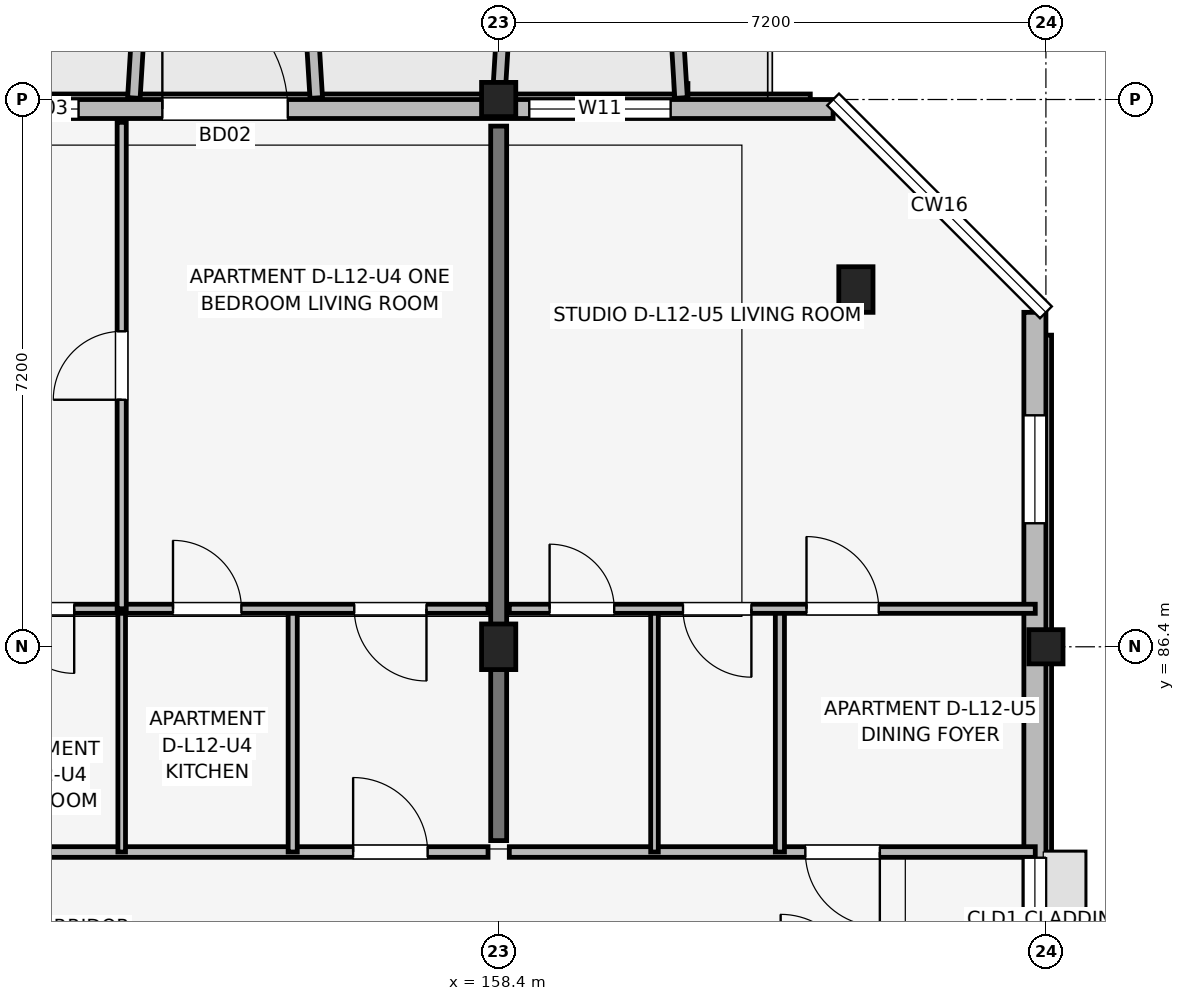
"""IFC4 building model, lengths in metres.
Left out: names, types, materials, properties, quantities, classifications, styles, units other than length and angle.
Written with IfcOpenShell. Run it as: python <this file> out.ifc"""

import sys

from ifc_helpers import new_model, si_unit, direction, frame, frame_2d, origin, origin_2d, place, context, subcontext, project, spatial, rectangle, extrude, element, fill, save


model = new_model("IFC4")
c1 = context("Model", 3, precision=1e-05, world=origin(), true_north=direction((0.0, 1.0)))
c2 = subcontext(c1, "Body", "Model", "MODEL_VIEW")
j1 = project(units=[si_unit("LENGTHUNIT", "METRE"), si_unit("PLANEANGLEUNIT", "RADIAN")], contexts=[c1])
p1 = place(None, origin())
s1 = spatial("IfcSite", under=j1, at=p1, CompositionType="ELEMENT")
p2 = place(p1, origin())
s2 = spatial("IfcBuilding", under=s1, at=p2, CompositionType="ELEMENT")
p3 = place(p2, frame((0.0, 0.0, 40.2)))
s3 = spatial("IfcBuildingStorey", under=s2, at=p3, CompositionType="ELEMENT", Elevation=40.2)
p4 = place(p3, frame((158.4, 86.4, 0.0), z_axis=(0.0, 0.0, 1.0), x_axis=(1.0, 0.0, 0.0)))
e1 = element("IfcColumn", 1, at=p4, inside=s3, PredefinedType="COLUMN", context=c2, shape_type="SweptSolid", body=[
    extrude(rectangle(XDim=0.45, YDim=0.6, at=origin_2d()), origin(), (0.0, 0.0, 1.0), 3.15),
])
for number, where, z_axis, x_axis in (
    (2, (158.4, 93.6, 0.0), (0.0, 0.0, 1.0), (1.0, 0.0, 0.0)),
    (3, (165.6, 86.4, 0.0), (0.0, 0.0, 1.0), (1.0, 0.0, 0.0)),
):
    element("IfcColumn", number, at=place(p3, frame(where, z_axis=z_axis, x_axis=x_axis)), inside=s3, PredefinedType="COLUMN", context=c2, shape_type="SweptSolid", body=[
        extrude(rectangle(XDim=0.45, YDim=0.45, at=origin_2d()), origin(), (0.0, 0.0, 1.0), 3.15),
    ])
p5 = place(p3, frame((163.1, 91.1, 0.0), z_axis=(0.0, 0.0, 1.0), x_axis=(1.0, 0.0, 0.0)))
e4 = element("IfcColumn", 4, at=p5, inside=s3, PredefinedType="COLUMN", context=c2, shape_type="SweptSolid", body=[
    extrude(rectangle(XDim=0.45, YDim=0.6, at=origin_2d()), origin(), (0.0, 0.0, 1.0), 3.15),
])
p6 = place(p3, frame((158.4, 83.85, 0.0), z_axis=(0.0, 0.0, 1.0), x_axis=(0.0, 1.0, 0.0)))
e5 = element("IfcWall", 5, at=p6, inside=s3, PredefinedType="SHEAR", context=c2, shape_type="SweptSolid", body=[
    extrude(rectangle(XDim=9.4, YDim=0.21, at=frame_2d((4.7, 0.0))), origin(), (0.0, 0.0, 1.0), 3.15),
])
p7 = place(p3, frame((165.455, 74.8, 0.0), z_axis=(0.0, 0.0, 1.0), x_axis=(0.0, 1.0, 0.0)))
e6 = element("IfcWall", 6, at=p7, inside=s3, PredefinedType="SOLIDWALL", context=c2, shape_type="SweptSolid", body=[
    extrude(rectangle(XDim=16.0, YDim=0.29, at=frame_2d((8.0, 0.0))), origin(), (0.0, 0.0, 1.0), 2.51),
])
p8 = place(p7, frame((7.175, 0.0, 1.05)))
e7 = element("IfcOpeningElement", 7, at=p8, cuts=e6, PredefinedType="OPENING", context=c2, shape_type="SweptSolid", body=[
    extrude(rectangle(XDim=1.65, YDim=1.15, at=frame_2d((0.825, 0.575))), frame((0.0, 0.155, 0.0), z_axis=(0.0, -1.0, 0.0), x_axis=(1.0, 0.0, 0.0)), (0.0, 0.0, 1.0), 0.31),
])
p9 = place(p7, frame((13.225, 0.0, 0.75)))
e8 = element("IfcOpeningElement", 8, at=p9, cuts=e6, PredefinedType="OPENING", context=c2, shape_type="SweptSolid", body=[
    extrude(rectangle(XDim=1.42, YDim=1.6, at=frame_2d((0.71, 0.8))), frame((0.0, 0.155, 0.0), z_axis=(0.0, -1.0, 0.0), x_axis=(1.0, 0.0, 0.0)), (0.0, 0.0, 1.0), 0.31),
])
p10 = place(p3, frame((162.8, 93.475, 0.0), z_axis=(0.0, 0.0, 1.0), x_axis=(-1.0, 0.0, 0.0)))
e9 = element("IfcWall", 9, at=p10, inside=s3, PredefinedType="SOLIDWALL", context=c2, shape_type="SweptSolid", body=[
    extrude(rectangle(XDim=30.4, YDim=0.25, at=frame_2d((15.2, 0.0))), origin(), (0.0, 0.0, 1.0), 2.48),
])
p11 = place(p10, frame((23.3, 0.0, 0.0), z_axis=(0.0, 0.0, 1.0), x_axis=(-1.0, 0.0, 0.0)))
e10 = element("IfcOpeningElement", 10, at=p11, cuts=e9, PredefinedType="OPENING", context=c2, shape_type="SweptSolid", body=[
    extrude(rectangle(XDim=1.8, YDim=2.15, at=frame_2d((0.9, 1.075))), frame((0.0, 0.135, 0.0), z_axis=(0.0, -1.0, 0.0), x_axis=(1.0, 0.0, 0.0)), (0.0, 0.0, 1.0), 0.27),
])
p12 = place(p10, frame((8.825, 0.0, 0.0), z_axis=(0.0, 0.0, 1.0), x_axis=(-1.0, 0.0, 0.0)))
e11 = element("IfcOpeningElement", 11, at=p12, cuts=e9, PredefinedType="OPENING", context=c2, shape_type="SweptSolid", body=[
    extrude(rectangle(XDim=1.65, YDim=2.15, at=frame_2d((0.825, 1.075))), frame((0.0, 0.135, 0.0), z_axis=(0.0, -1.0, 0.0), x_axis=(1.0, 0.0, 0.0)), (0.0, 0.0, 1.0), 0.27),
])
p13 = place(p10, frame((26.603, 0.0, 0.75)))
e12 = element("IfcOpeningElement", 12, at=p13, cuts=e9, PredefinedType="OPENING", context=c2, shape_type="SweptSolid", body=[
    extrude(rectangle(XDim=1.46, YDim=1.55, at=frame_2d((0.73, 0.775))), frame((0.0, 0.135, 0.0), z_axis=(0.0, -1.0, 0.0), x_axis=(1.0, 0.0, 0.0)), (0.0, 0.0, 1.0), 0.27),
])
p14 = place(p10, frame((24.452, 0.0, 0.75)))
e13 = element("IfcOpeningElement", 13, at=p14, cuts=e9, PredefinedType="OPENING", context=c2, shape_type="SweptSolid", body=[
    extrude(rectangle(XDim=0.6, YDim=1.25, at=frame_2d((0.3, 0.625))), frame((0.0, 0.135, 0.0), z_axis=(0.0, -1.0, 0.0), x_axis=(1.0, 0.0, 0.0)), (0.0, 0.0, 1.0), 0.27),
])
p15 = place(p10, frame((14.2, 0.0, 0.7)))
e14 = element("IfcOpeningElement", 14, at=p15, cuts=e9, PredefinedType="OPENING", context=c2, shape_type="SweptSolid", body=[
    extrude(rectangle(XDim=2.0, YDim=1.65, at=frame_2d((1.0, 0.825))), frame((0.0, 0.135, 0.0), z_axis=(0.0, -1.0, 0.0), x_axis=(1.0, 0.0, 0.0)), (0.0, 0.0, 1.0), 0.27),
])
p16 = place(p10, frame((9.927, 0.0, 0.75)))
e15 = element("IfcOpeningElement", 15, at=p16, cuts=e9, PredefinedType="OPENING", context=c2, shape_type="SweptSolid", body=[
    extrude(rectangle(XDim=0.85, YDim=1.4, at=frame_2d((0.425, 0.7))), frame((0.0, 0.135, 0.0), z_axis=(0.0, -1.0, 0.0), x_axis=(1.0, 0.0, 0.0)), (0.0, 0.0, 1.0), 0.27),
])
p17 = place(p10, frame((2.137, 0.0, 0.7)))
e16 = element("IfcOpeningElement", 16, at=p17, cuts=e9, PredefinedType="OPENING", context=c2, shape_type="SweptSolid", body=[
    extrude(rectangle(XDim=1.86, YDim=1.6, at=frame_2d((0.93, 0.8))), frame((0.0, 0.135, 0.0), z_axis=(0.0, -1.0, 0.0), x_axis=(1.0, 0.0, 0.0)), (0.0, 0.0, 1.0), 0.27),
])
for number, where, z_axis, x_axis in (
    (17, (153.6, 93.62, 0.0), (0.0, 0.0, 1.0), (0.061, 0.998, 0.0)),
    (18, (156.0, 93.62, 0.0), (0.0, 0.0, 1.0), (-0.061, 0.998, 0.0)),
):
    element("IfcWall", number, at=place(p3, frame(where, z_axis=z_axis, x_axis=x_axis)), inside=s3, PredefinedType="ELEMENTEDWALL", context=c2, shape_type="SweptSolid", body=[
        extrude(rectangle(XDim=1.964, YDim=0.165, at=frame_2d((0.982, 0.0))), origin(), (0.0, 0.0, 1.0), 2.48),
    ])
for number, where, z_axis, x_axis in (
    (19, (158.4, 93.62, 0.0), (0.0, 0.0, 1.0), (0.061, 0.998, 0.0)),
    (20, (160.8, 93.62, 0.0), (0.0, 0.0, 1.0), (-0.061, 0.998, 0.0)),
):
    element("IfcWall", number, at=place(p3, frame(where, z_axis=z_axis, x_axis=x_axis)), inside=s3, PredefinedType="ELEMENTEDWALL", context=c2, shape_type="SweptSolid", body=[
        extrude(rectangle(XDim=1.964, YDim=0.165, at=frame_2d((0.982, 0.0))), origin(), (0.0, 0.0, 1.0), 2.95),
    ])
p18 = place(p3, frame((151.34, 83.7, 0.0), z_axis=(0.0, 0.0, 1.0), x_axis=(1.0, 0.0, 0.0)))
e21 = element("IfcWall", 21, at=p18, inside=s3, PredefinedType="PARTITIONING", context=c2, shape_type="SweptSolid", body=[
    extrude(rectangle(XDim=6.92, YDim=0.14, at=frame_2d((3.46, 0.0))), origin(), (0.0, 0.0, 1.0), 2.38),
])
p19 = place(p18, frame((5.145, 0.0, 0.0)))
e22 = element("IfcOpeningElement", 22, at=p19, cuts=e21, PredefinedType="OPENING", context=c2, shape_type="SweptSolid", body=[
    extrude(rectangle(XDim=0.98, YDim=2.1, at=frame_2d((0.49, 1.05))), frame((0.0, 0.08, 0.0), z_axis=(0.0, -1.0, 0.0), x_axis=(1.0, 0.0, 0.0)), (0.0, 0.0, 1.0), 0.16),
])
p20 = place(p3, frame((153.44, 83.7, 0.0), z_axis=(0.0, 0.0, 1.0), x_axis=(0.0, 1.0, 0.0)))
e23 = element("IfcWall", 23, at=p20, inside=s3, PredefinedType="PARTITIONING", context=c2, shape_type="SweptSolid", body=[
    extrude(rectangle(XDim=3.2, YDim=0.1, at=frame_2d((1.6, 0.0))), origin(), (0.0, 0.0, 1.0), 2.38),
])
p21 = place(p3, frame((155.69, 83.7, 0.0), z_axis=(0.0, 0.0, 1.0), x_axis=(0.0, 1.0, 0.0)))
e24 = element("IfcWall", 24, at=p21, inside=s3, PredefinedType="PARTITIONING", context=c2, shape_type="SweptSolid", body=[
    extrude(rectangle(XDim=3.2, YDim=0.12, at=frame_2d((1.6, 0.0))), origin(), (0.0, 0.0, 1.0), 2.38),
])
p22 = place(p3, frame((151.34, 86.9, 0.0), z_axis=(0.0, 0.0, 1.0), x_axis=(1.0, 0.0, 0.0)))
e25 = element("IfcWall", 25, at=p22, inside=s3, PredefinedType="PARTITIONING", context=c2, shape_type="SweptSolid", body=[
    extrude(rectangle(XDim=6.92, YDim=0.12, at=frame_2d((3.46, 0.0))), origin(), (0.0, 0.0, 1.0), 2.38),
])
p23 = place(p22, frame((1.475, 0.0, 0.0), z_axis=(0.0, 0.0, 1.0), x_axis=(-1.0, 0.0, 0.0)))
e26 = element("IfcOpeningElement", 26, at=p23, cuts=e25, PredefinedType="OPENING", context=c2, shape_type="SweptSolid", body=[
    extrude(rectangle(XDim=0.85, YDim=2.08, at=frame_2d((0.425, 1.04))), frame((0.0, 0.07, 0.0), z_axis=(0.0, -1.0, 0.0), x_axis=(1.0, 0.0, 0.0)), (0.0, 0.0, 1.0), 0.14),
])
p24 = place(p22, frame((2.775, 0.0, 0.0)))
e27 = element("IfcOpeningElement", 27, at=p24, cuts=e25, PredefinedType="OPENING", context=c2, shape_type="SweptSolid", body=[
    extrude(rectangle(XDim=0.9, YDim=2.08, at=frame_2d((0.45, 1.04))), frame((0.0, 0.07, 0.0), z_axis=(0.0, -1.0, 0.0), x_axis=(1.0, 0.0, 0.0)), (0.0, 0.0, 1.0), 0.14),
])
p25 = place(p22, frame((6.11, 0.0, 0.0), z_axis=(0.0, 0.0, 1.0), x_axis=(-1.0, 0.0, 0.0)))
e28 = element("IfcOpeningElement", 28, at=p25, cuts=e25, PredefinedType="OPENING", context=c2, shape_type="SweptSolid", body=[
    extrude(rectangle(XDim=0.95, YDim=2.08, at=frame_2d((0.475, 1.04))), frame((0.0, 0.07, 0.0), z_axis=(0.0, -1.0, 0.0), x_axis=(1.0, 0.0, 0.0)), (0.0, 0.0, 1.0), 0.14),
])
p26 = place(p3, frame((153.44, 86.9, 0.0), z_axis=(0.0, 0.0, 1.0), x_axis=(0.0, 1.0, 0.0)))
e29 = element("IfcWall", 29, at=p26, inside=s3, PredefinedType="PARTITIONING", context=c2, shape_type="SweptSolid", body=[
    extrude(rectangle(XDim=6.4, YDim=0.12, at=frame_2d((3.2, 0.0))), origin(), (0.0, 0.0, 1.0), 2.38),
])
p27 = place(p26, frame((2.75, 0.0, 0.0)))
e30 = element("IfcOpeningElement", 30, at=p27, cuts=e29, PredefinedType="OPENING", context=c2, shape_type="SweptSolid", body=[
    extrude(rectangle(XDim=0.9, YDim=2.08, at=frame_2d((0.45, 1.04))), frame((0.0, 0.07, 0.0), z_axis=(0.0, -1.0, 0.0), x_axis=(1.0, 0.0, 0.0)), (0.0, 0.0, 1.0), 0.14),
])
p28 = place(p3, frame((158.54, 83.7, 0.0), z_axis=(0.0, 0.0, 1.0), x_axis=(1.0, 0.0, 0.0)))
e31 = element("IfcWall", 31, at=p28, inside=s3, PredefinedType="PARTITIONING", context=c2, shape_type="SweptSolid", body=[
    extrude(rectangle(XDim=6.92, YDim=0.14, at=frame_2d((3.46, 0.0))), origin(), (0.0, 0.0, 1.0), 2.38),
])
p29 = place(p28, frame((4.875, 0.0, 0.0), z_axis=(0.0, 0.0, 1.0), x_axis=(-1.0, 0.0, 0.0)))
e32 = element("IfcOpeningElement", 32, at=p29, cuts=e31, PredefinedType="OPENING", context=c2, shape_type="SweptSolid", body=[
    extrude(rectangle(XDim=0.98, YDim=2.1, at=frame_2d((0.49, 1.05))), frame((0.0, 0.08, 0.0), z_axis=(0.0, -1.0, 0.0), x_axis=(1.0, 0.0, 0.0)), (0.0, 0.0, 1.0), 0.16),
])
p30 = place(p3, frame((160.45, 83.7, 0.0), z_axis=(0.0, 0.0, 1.0), x_axis=(0.0, 1.0, 0.0)))
e33 = element("IfcWall", 33, at=p30, inside=s3, PredefinedType="PARTITIONING", context=c2, shape_type="SweptSolid", body=[
    extrude(rectangle(XDim=3.2, YDim=0.1, at=frame_2d((1.6, 0.0))), origin(), (0.0, 0.0, 1.0), 2.38),
])
p31 = place(p3, frame((162.1, 83.7, 0.0), z_axis=(0.0, 0.0, 1.0), x_axis=(0.0, 1.0, 0.0)))
e34 = element("IfcWall", 34, at=p31, inside=s3, PredefinedType="PARTITIONING", context=c2, shape_type="SweptSolid", body=[
    extrude(rectangle(XDim=3.2, YDim=0.12, at=frame_2d((1.6, 0.0))), origin(), (0.0, 0.0, 1.0), 2.38),
])
p32 = place(p3, frame((158.54, 86.9, 0.0), z_axis=(0.0, 0.0, 1.0), x_axis=(1.0, 0.0, 0.0)))
e35 = element("IfcWall", 35, at=p32, inside=s3, PredefinedType="PARTITIONING", context=c2, shape_type="SweptSolid", body=[
    extrude(rectangle(XDim=6.92, YDim=0.12, at=frame_2d((3.46, 0.0))), origin(), (0.0, 0.0, 1.0), 2.38),
])
p33 = place(p32, frame((0.53, 0.0, 0.0)))
e36 = element("IfcOpeningElement", 36, at=p33, cuts=e35, PredefinedType="OPENING", context=c2, shape_type="SweptSolid", body=[
    extrude(rectangle(XDim=0.85, YDim=2.08, at=frame_2d((0.425, 1.04))), frame((0.0, 0.07, 0.0), z_axis=(0.0, -1.0, 0.0), x_axis=(1.0, 0.0, 0.0)), (0.0, 0.0, 1.0), 0.14),
])
p34 = place(p32, frame((3.185, 0.0, 0.0), z_axis=(0.0, 0.0, 1.0), x_axis=(-1.0, 0.0, 0.0)))
e37 = element("IfcOpeningElement", 37, at=p34, cuts=e35, PredefinedType="OPENING", context=c2, shape_type="SweptSolid", body=[
    extrude(rectangle(XDim=0.9, YDim=2.08, at=frame_2d((0.45, 1.04))), frame((0.0, 0.07, 0.0), z_axis=(0.0, -1.0, 0.0), x_axis=(1.0, 0.0, 0.0)), (0.0, 0.0, 1.0), 0.14),
])
p35 = place(p32, frame((3.91, 0.0, 0.0)))
e38 = element("IfcOpeningElement", 38, at=p35, cuts=e35, PredefinedType="OPENING", context=c2, shape_type="SweptSolid", body=[
    extrude(rectangle(XDim=0.95, YDim=2.08, at=frame_2d((0.475, 1.04))), frame((0.0, 0.07, 0.0), z_axis=(0.0, -1.0, 0.0), x_axis=(1.0, 0.0, 0.0)), (0.0, 0.0, 1.0), 0.14),
])
p36 = place(p12, origin())
e39 = element("IfcDoor", 39, at=p36, inside=s3, OperationType="SINGLE_SWING_RIGHT", PredefinedType="DOOR", context=c2, shape_type="SweptSolid", body=[
    extrude(rectangle(XDim=1.65, YDim=2.15, at=frame_2d((0.825, 1.075))), frame((0.0, 0.025, 0.0), z_axis=(0.0, -1.0, 0.0), x_axis=(1.0, 0.0, 0.0)), (0.0, 0.0, 1.0), 0.05),
])
fill(e11, e39)
p37 = place(p16, origin())
e40 = element("IfcWindow", 40, at=p37, inside=s3, PartitioningType="SINGLE_PANEL", PredefinedType="WINDOW", context=c2, shape_type="SweptSolid", body=[
    extrude(rectangle(XDim=0.85, YDim=1.4, at=frame_2d((0.425, 0.7))), frame((0.0, 0.03, 0.0), z_axis=(0.0, -1.0, 0.0), x_axis=(1.0, 0.0, 0.0)), (0.0, 0.0, 1.0), 0.06),
])
fill(e15, e40)
p38 = place(p17, origin())
e41 = element("IfcWindow", 41, at=p38, inside=s3, PartitioningType="SINGLE_PANEL", PredefinedType="WINDOW", context=c2, shape_type="SweptSolid", body=[
    extrude(rectangle(XDim=1.86, YDim=1.6, at=frame_2d((0.93, 0.8))), frame((0.0, 0.03, 0.0), z_axis=(0.0, -1.0, 0.0), x_axis=(1.0, 0.0, 0.0)), (0.0, 0.0, 1.0), 0.06),
])
fill(e16, e41)
p39 = place(p8, origin())
e42 = element("IfcWindow", 42, at=p39, inside=s3, PartitioningType="SINGLE_PANEL", PredefinedType="WINDOW", context=c2, shape_type="SweptSolid", body=[
    extrude(rectangle(XDim=1.65, YDim=1.15, at=frame_2d((0.825, 0.575))), frame((0.0, 0.03, 0.0), z_axis=(0.0, -1.0, 0.0), x_axis=(1.0, 0.0, 0.0)), (0.0, 0.0, 1.0), 0.06),
])
fill(e7, e42)
p40 = place(p9, origin())
e43 = element("IfcWindow", 43, at=p40, inside=s3, PartitioningType="SINGLE_PANEL", PredefinedType="WINDOW", context=c2, shape_type="SweptSolid", body=[
    extrude(rectangle(XDim=1.42, YDim=1.6, at=frame_2d((0.71, 0.8))), frame((0.0, 0.03, 0.0), z_axis=(0.0, -1.0, 0.0), x_axis=(1.0, 0.0, 0.0)), (0.0, 0.0, 1.0), 0.06),
])
fill(e8, e43)
p41 = place(p19, origin())
e44 = element("IfcDoor", 44, at=p41, inside=s3, OperationType="SINGLE_SWING_LEFT", PredefinedType="DOOR", context=c2, shape_type="SweptSolid", body=[
    extrude(rectangle(XDim=0.98, YDim=2.1, at=frame_2d((0.49, 1.05))), frame((0.0, 0.025, 0.0), z_axis=(0.0, -1.0, 0.0), x_axis=(1.0, 0.0, 0.0)), (0.0, 0.0, 1.0), 0.05),
])
fill(e22, e44)
p42 = place(p23, origin())
e45 = element("IfcDoor", 45, at=p42, inside=s3, OperationType="SINGLE_SWING_RIGHT", PredefinedType="DOOR", context=c2, shape_type="SweptSolid", body=[
    extrude(rectangle(XDim=0.85, YDim=2.08, at=frame_2d((0.425, 1.04))), frame((0.0, 0.025, 0.0), z_axis=(0.0, -1.0, 0.0), x_axis=(1.0, 0.0, 0.0)), (0.0, 0.0, 1.0), 0.05),
])
fill(e26, e45)
p43 = place(p24, origin())
e46 = element("IfcDoor", 46, at=p43, inside=s3, OperationType="SINGLE_SWING_LEFT", PredefinedType="DOOR", context=c2, shape_type="SweptSolid", body=[
    extrude(rectangle(XDim=0.9, YDim=2.08, at=frame_2d((0.45, 1.04))), frame((0.0, 0.025, 0.0), z_axis=(0.0, -1.0, 0.0), x_axis=(1.0, 0.0, 0.0)), (0.0, 0.0, 1.0), 0.05),
])
fill(e27, e46)
p44 = place(p25, origin())
e47 = element("IfcDoor", 47, at=p44, inside=s3, OperationType="SINGLE_SWING_RIGHT", PredefinedType="DOOR", context=c2, shape_type="SweptSolid", body=[
    extrude(rectangle(XDim=0.95, YDim=2.08, at=frame_2d((0.475, 1.04))), frame((0.0, 0.025, 0.0), z_axis=(0.0, -1.0, 0.0), x_axis=(1.0, 0.0, 0.0)), (0.0, 0.0, 1.0), 0.05),
])
fill(e28, e47)
p45 = place(p27, origin())
e48 = element("IfcDoor", 48, at=p45, inside=s3, OperationType="SINGLE_SWING_LEFT", PredefinedType="DOOR", context=c2, shape_type="SweptSolid", body=[
    extrude(rectangle(XDim=0.9, YDim=2.08, at=frame_2d((0.45, 1.04))), frame((0.0, 0.025, 0.0), z_axis=(0.0, -1.0, 0.0), x_axis=(1.0, 0.0, 0.0)), (0.0, 0.0, 1.0), 0.05),
])
fill(e30, e48)
p46 = place(p29, origin())
e49 = element("IfcDoor", 49, at=p46, inside=s3, OperationType="SINGLE_SWING_RIGHT", PredefinedType="DOOR", context=c2, shape_type="SweptSolid", body=[
    extrude(rectangle(XDim=0.98, YDim=2.1, at=frame_2d((0.49, 1.05))), frame((0.0, 0.025, 0.0), z_axis=(0.0, -1.0, 0.0), x_axis=(1.0, 0.0, 0.0)), (0.0, 0.0, 1.0), 0.05),
])
fill(e32, e49)
p47 = place(p33, origin())
e50 = element("IfcDoor", 50, at=p47, inside=s3, OperationType="SINGLE_SWING_LEFT", PredefinedType="DOOR", context=c2, shape_type="SweptSolid", body=[
    extrude(rectangle(XDim=0.85, YDim=2.08, at=frame_2d((0.425, 1.04))), frame((0.0, 0.025, 0.0), z_axis=(0.0, -1.0, 0.0), x_axis=(1.0, 0.0, 0.0)), (0.0, 0.0, 1.0), 0.05),
])
fill(e36, e50)
p48 = place(p34, origin())
e51 = element("IfcDoor", 51, at=p48, inside=s3, OperationType="SINGLE_SWING_RIGHT", PredefinedType="DOOR", context=c2, shape_type="SweptSolid", body=[
    extrude(rectangle(XDim=0.9, YDim=2.08, at=frame_2d((0.45, 1.04))), frame((0.0, 0.025, 0.0), z_axis=(0.0, -1.0, 0.0), x_axis=(1.0, 0.0, 0.0)), (0.0, 0.0, 1.0), 0.05),
])
fill(e37, e51)
p49 = place(p35, origin())
e52 = element("IfcDoor", 52, at=p49, inside=s3, OperationType="SINGLE_SWING_LEFT", PredefinedType="DOOR", context=c2, shape_type="SweptSolid", body=[
    extrude(rectangle(XDim=0.95, YDim=2.08, at=frame_2d((0.475, 1.04))), frame((0.0, 0.025, 0.0), z_axis=(0.0, -1.0, 0.0), x_axis=(1.0, 0.0, 0.0)), (0.0, 0.0, 1.0), 0.05),
])
fill(e38, e52)
save(model, sys.argv[1])
